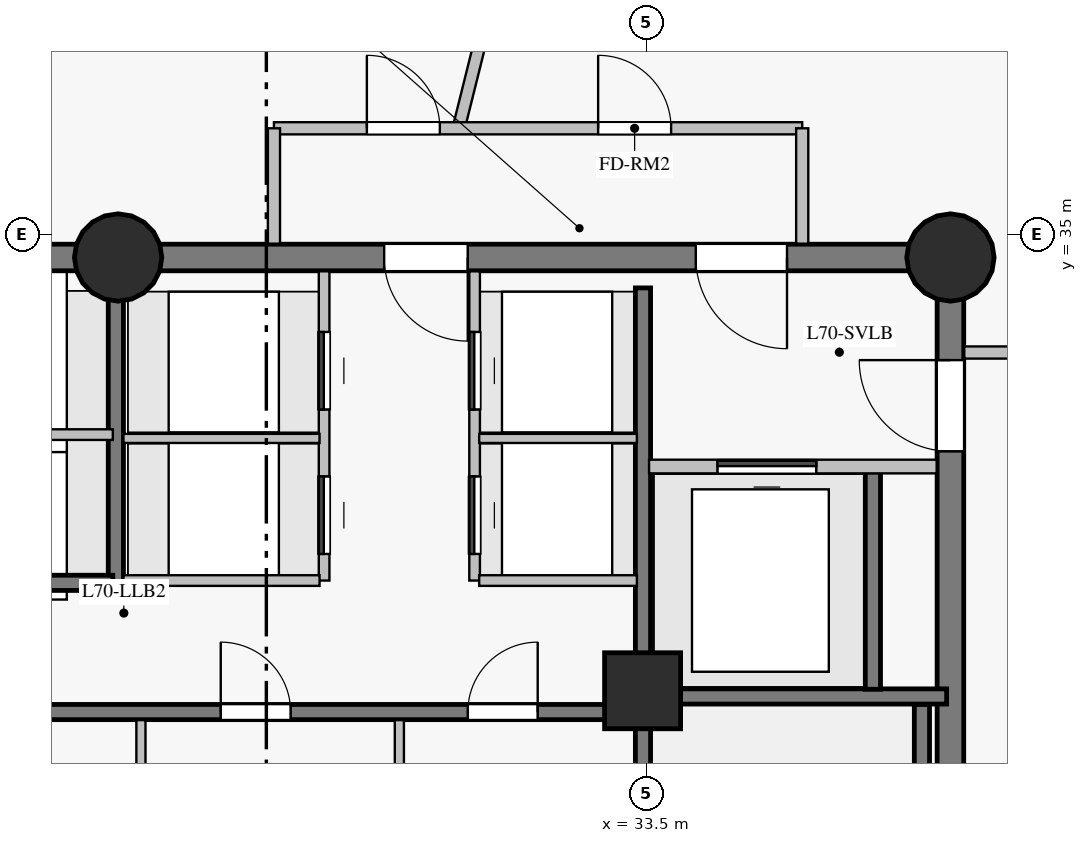
"""IFC4 building model, lengths in metres.
Left out: names, types, materials, properties, quantities, classifications, styles, units other than length and angle.
Written with IfcOpenShell. Run it as: python <this file> out.ifc"""

import sys

from ifc_helpers import new_model, si_unit, direction, frame, frame_2d, origin, origin_with_axes, origin_2d, place, context, subcontext, project, spatial, rectangle, circle, extrude, source, transform, mapped, element, fill, save


model = new_model("IFC4")
c1 = context("Model", 3, precision=1e-05, world=origin(), true_north=direction((0.0, 1.0)))
c2 = subcontext(c1, "Body", "Model", "MODEL_VIEW")
j1 = project(units=[si_unit("LENGTHUNIT", "METRE"), si_unit("PLANEANGLEUNIT", "RADIAN")], contexts=[c1])
p1 = place(None, origin())
s1 = spatial("IfcSite", under=j1, at=p1, CompositionType="ELEMENT")
p2 = place(p1, origin())
s2 = spatial("IfcBuilding", under=s1, at=p2, CompositionType="ELEMENT")
p3 = place(p2, frame((0.0, 0.0, 238.25)))
s3 = spatial("IfcBuildingStorey", under=s2, at=p3, CompositionType="ELEMENT", Elevation=238.25)
p4 = place(p3, frame((37.5, 18.3, 0.0), z_axis=(0.0, 0.0, 1.0), x_axis=(0.0, 1.0, 0.0)))
e1 = element("IfcWall", 1, at=p4, inside=s3, PredefinedType="SHEAR", context=c2, shape_type="SweptSolid", body=[
    extrude(rectangle(XDim=16.4, YDim=0.35, at=frame_2d((8.2, 0.0))), origin(), (0.0, 0.0, 1.0), 2.85),
])
p5 = place(p4, frame((13.85, 0.0, 0.0)))
e2 = element("IfcOpeningElement", 2, at=p5, cuts=e1, PredefinedType="OPENING", context=c2, shape_type="SweptSolid", body=[
    extrude(rectangle(XDim=1.2, YDim=2.15, at=frame_2d((0.6, 1.075))), frame((0.0, 0.185, 0.0), z_axis=(0.0, -1.0, 0.0), x_axis=(1.0, 0.0, 0.0)), (0.0, 0.0, 1.0), 0.37),
])
p6 = place(p3, frame((37.5, 34.7, 0.0), z_axis=(0.0, 0.0, 1.0), x_axis=(-1.0, 0.0, 0.0)))
e3 = element("IfcWall", 3, at=p6, inside=s3, PredefinedType="SHEAR", context=c2, shape_type="SweptSolid", body=[
    extrude(rectangle(XDim=10.95, YDim=0.35, at=frame_2d((5.475, 0.0))), origin(), (0.0, 0.0, 1.0), 2.85),
])
p7 = place(p6, frame((2.15, 0.0, 0.0)))
e4 = element("IfcOpeningElement", 4, at=p7, cuts=e3, PredefinedType="OPENING", context=c2, shape_type="SweptSolid", body=[
    extrude(rectangle(XDim=1.2, YDim=2.15, at=frame_2d((0.6, 1.075))), frame((0.0, 0.185, 0.0), z_axis=(0.0, -1.0, 0.0), x_axis=(1.0, 0.0, 0.0)), (0.0, 0.0, 1.0), 0.37),
])
p8 = place(p6, frame((6.35, 0.0, 0.0)))
e5 = element("IfcOpeningElement", 5, at=p8, cuts=e3, PredefinedType="OPENING", context=c2, shape_type="SweptSolid", body=[
    extrude(rectangle(XDim=1.1, YDim=2.15, at=frame_2d((0.55, 1.075))), frame((0.0, 0.185, 0.0), z_axis=(0.0, -1.0, 0.0), x_axis=(1.0, 0.0, 0.0)), (0.0, 0.0, 1.0), 0.37),
])
p9 = place(p3, frame((26.55, 34.7, 0.0), z_axis=(0.0, 0.0, 1.0), x_axis=(-1.0, 0.0, 0.0)))
e6 = element("IfcWall", 6, at=p9, inside=s3, PredefinedType="SHEAR", context=c2, shape_type="SweptSolid", body=[
    extrude(rectangle(XDim=7.05, YDim=0.35, at=frame_2d((3.525, 0.0))), origin(), (0.0, 0.0, 1.0), 2.85),
])
m1 = source(origin_with_axes(), c2, "Body", "SweptSolid", [
    extrude(circle(Radius=0.575, at=origin_2d()), origin(), (0.0, 0.0, 1.0), 3.05),
])
for number, where, z_axis, x_axis in (
    (7, (26.55, 34.7, 0.0), (0.0, 0.0, 1.0), (1.0, 0.0, 0.0)),
    (8, (37.5, 34.7, 0.0), (0.0, 0.0, 1.0), (1.0, 0.0, 0.0)),
):
    element("IfcColumn", number, at=place(p3, frame(where, z_axis=z_axis, x_axis=x_axis)), inside=s3, PredefinedType="COLUMN", context=c2, shape_type="MappedRepresentation", body=[
        mapped(m1, transform((0.0, 0.0, 0.0), scale=1.0)),
    ])
m2 = source(origin_with_axes(), c2, "Body", "SweptSolid", [
    extrude(rectangle(XDim=1.0, YDim=1.0, at=origin_2d()), origin(), (0.0, 0.0, 1.0), 3.05),
])
p10 = place(p3, frame((33.45, 29.0, 0.0), z_axis=(0.0, 0.0, 1.0), x_axis=(1.0, 0.0, 0.0)))
e9 = element("IfcColumn", 9, at=p10, inside=s3, PredefinedType="COLUMN", context=c2, shape_type="MappedRepresentation", body=[
    mapped(m2, transform((0.0, 0.0, 0.0), scale=1.0)),
])
p11 = place(p3, frame((43.586, 36.421, 0.0), z_axis=(0.0, 0.0, 1.0), x_axis=(-0.582142908701, 0.813086486082, 0.0)))
e10 = element("IfcWall", 10, at=p11, inside=s3, PredefinedType="SOLIDWALL", context=c2, shape_type="SweptSolid", body=[
    extrude(rectangle(XDim=11.712, YDim=0.28, at=frame_2d((5.856, 0.0))), origin(), (0.0, 0.0, 1.0), 2.85),
])
p12 = place(p11, frame((1.406, 0.0, 0.85)))
e11 = element("IfcOpeningElement", 11, at=p12, cuts=e10, PredefinedType="OPENING", context=c2, shape_type="SweptSolid", body=[
    extrude(rectangle(XDim=1.6, YDim=1.6, at=frame_2d((0.8, 0.8))), frame((0.0, 0.15, 0.0), z_axis=(0.0, -1.0, 0.0), x_axis=(1.0, 0.0, 0.0)), (0.0, 0.0, 1.0), 0.3),
])
p13 = place(p11, frame((5.056, 0.0, 0.85)))
e12 = element("IfcOpeningElement", 12, at=p13, cuts=e10, PredefinedType="OPENING", context=c2, shape_type="SweptSolid", body=[
    extrude(rectangle(XDim=1.6, YDim=1.6, at=frame_2d((0.8, 0.8))), frame((0.0, 0.15, 0.0), z_axis=(0.0, -1.0, 0.0), x_axis=(1.0, 0.0, 0.0)), (0.0, 0.0, 1.0), 0.3),
])
p14 = place(p11, frame((8.707, 0.0, 0.85)))
e13 = element("IfcOpeningElement", 13, at=p14, cuts=e10, PredefinedType="OPENING", context=c2, shape_type="SweptSolid", body=[
    extrude(rectangle(XDim=1.6, YDim=1.6, at=frame_2d((0.8, 0.8))), frame((0.0, 0.15, 0.0), z_axis=(0.0, -1.0, 0.0), x_axis=(1.0, 0.0, 0.0)), (0.0, 0.0, 1.0), 0.3),
])
p15 = place(p3, frame((33.455, 18.7, 0.0), z_axis=(0.0, 0.0, 1.0), x_axis=(0.0, 1.0, 0.0)))
e14 = element("IfcWall", 14, at=p15, inside=s3, PredefinedType="SHEAR", context=c2, shape_type="SweptSolid", body=[
    extrude(rectangle(XDim=15.6, YDim=0.2, at=frame_2d((7.8, 0.0))), origin(), (0.0, 0.0, 1.0), 2.85),
])
p16 = place(p15, frame((2.75, 0.0, 0.0)))
e15 = element("IfcOpeningElement", 15, at=p16, cuts=e14, PredefinedType="OPENING", context=c2, shape_type="SweptSolid", body=[
    extrude(rectangle(XDim=1.15, YDim=2.15, at=frame_2d((0.575, 1.075))), frame((0.0, 0.11, 0.0), z_axis=(0.0, -1.0, 0.0), x_axis=(1.0, 0.0, 0.0)), (0.0, 0.0, 1.0), 0.22),
])
p17 = place(p15, frame((0.55, 0.0, 0.0)))
e16 = element("IfcOpeningElement", 16, at=p17, cuts=e14, PredefinedType="OPENING", context=c2, shape_type="SweptSolid", body=[
    extrude(rectangle(XDim=0.94, YDim=2.1, at=frame_2d((0.47, 1.05))), frame((0.0, 0.11, 0.0), z_axis=(0.0, -1.0, 0.0), x_axis=(1.0, 0.0, 0.0)), (0.0, 0.0, 1.0), 0.22),
])
p18 = place(p3, frame((23.7, 28.72, 0.0), z_axis=(0.0, 0.0, 1.0), x_axis=(1.0, 0.0, 0.0)))
e17 = element("IfcWall", 17, at=p18, inside=s3, PredefinedType="SHEAR", context=c2, shape_type="SweptSolid", body=[
    extrude(rectangle(XDim=9.6, YDim=0.2, at=frame_2d((4.8, 0.0))), origin(), (0.0, 0.0, 1.0), 2.85),
])
p19 = place(p18, frame((0.7, 0.0, 0.0)))
e18 = element("IfcOpeningElement", 18, at=p19, cuts=e17, PredefinedType="OPENING", context=c2, shape_type="SweptSolid", body=[
    extrude(rectangle(XDim=0.92, YDim=2.1, at=frame_2d((0.46, 1.05))), frame((0.0, 0.11, 0.0), z_axis=(0.0, -1.0, 0.0), x_axis=(1.0, 0.0, 0.0)), (0.0, 0.0, 1.0), 0.22),
])
p20 = place(p18, frame((4.2, 0.0, 0.0)))
e19 = element("IfcOpeningElement", 19, at=p20, cuts=e17, PredefinedType="OPENING", context=c2, shape_type="SweptSolid", body=[
    extrude(rectangle(XDim=0.92, YDim=2.1, at=frame_2d((0.46, 1.05))), frame((0.0, 0.11, 0.0), z_axis=(0.0, -1.0, 0.0), x_axis=(1.0, 0.0, 0.0)), (0.0, 0.0, 1.0), 0.22),
])
p21 = place(p18, frame((7.45, 0.0, 0.0)))
e20 = element("IfcOpeningElement", 20, at=p21, cuts=e17, PredefinedType="OPENING", context=c2, shape_type="SweptSolid", body=[
    extrude(rectangle(XDim=0.92, YDim=2.1, at=frame_2d((0.46, 1.05))), frame((0.0, 0.11, 0.0), z_axis=(0.0, -1.0, 0.0), x_axis=(1.0, 0.0, 0.0)), (0.0, 0.0, 1.0), 0.22),
])
p22 = place(p3, frame((37.125, 21.32, 0.0), z_axis=(0.0, 0.0, 1.0), x_axis=(0.0, 1.0, 0.0)))
e21 = element("IfcWall", 21, at=p22, inside=s3, PredefinedType="SHEAR", context=c2, shape_type="SweptSolid", body=[
    extrude(rectangle(XDim=7.5, YDim=0.2, at=frame_2d((3.75, 0.0))), origin(), (0.0, 0.0, 1.0), 2.85),
])
p23 = place(p3, frame((33.455, 28.925, 0.0), z_axis=(0.0, 0.0, 1.0), x_axis=(1.0, 0.0, 0.0)))
e22 = element("IfcWall", 22, at=p23, inside=s3, PredefinedType="SHEAR", context=c2, shape_type="SweptSolid", body=[
    extrude(rectangle(XDim=3.995, YDim=0.2, at=frame_2d((1.998, 0.0))), origin(), (0.0, 0.0, 1.0), 2.85),
])
p24 = place(p3, frame((26.52, 30.42, 0.0), z_axis=(0.0, 0.0, 1.0), x_axis=(0.0, 1.0, 0.0)))
e23 = element("IfcWall", 23, at=p24, inside=s3, PredefinedType="SHEAR", context=c2, shape_type="SweptSolid", body=[
    extrude(rectangle(XDim=3.86, YDim=0.2, at=frame_2d((1.93, 0.0))), origin(), (0.0, 0.0, 1.0), 2.85),
])
p25 = place(p3, frame((36.48, 29.02, 0.0), z_axis=(0.0, 0.0, 1.0), x_axis=(0.0, 1.0, 0.0)))
e24 = element("IfcWall", 24, at=p25, inside=s3, PredefinedType="SHEAR", context=c2, shape_type="SweptSolid", body=[
    extrude(rectangle(XDim=2.86, YDim=0.2, at=frame_2d((1.43, 0.0))), origin(), (0.0, 0.0, 1.0), 2.85),
])
p26 = place(p3, frame((23.7, 30.42, 0.0), z_axis=(0.0, 0.0, 1.0), x_axis=(1.0, 0.0, 0.0)))
e25 = element("IfcWall", 25, at=p26, inside=s3, PredefinedType="SHEAR", context=c2, shape_type="SweptSolid", body=[
    extrude(rectangle(XDim=2.78, YDim=0.2, at=frame_2d((1.39, 0.0))), origin(), (0.0, 0.0, 1.0), 2.85),
])
p27 = place(p3, frame((31.023, 36.371, 0.0), z_axis=(0.0, 0.0, 1.0), x_axis=(0.241913852828, 0.970297731529, 0.0)))
e26 = element("IfcWall", 26, at=p27, inside=s3, PredefinedType="PARTITIONING", context=c2, shape_type="SweptSolid", body=[
    extrude(rectangle(XDim=10.348, YDim=0.16, at=frame_2d((5.174, 0.0))), origin(), (0.0, 0.0, 1.0), 2.85),
])
p28 = place(p3, frame((28.6, 36.4, 0.0), z_axis=(0.0, 0.0, 1.0), x_axis=(1.0, 0.0, 0.0)))
e27 = element("IfcWall", 27, at=p28, inside=s3, PredefinedType="PARTITIONING", context=c2, shape_type="SweptSolid", body=[
    extrude(rectangle(XDim=6.95, YDim=0.16, at=frame_2d((3.475, 0.0))), origin(), (0.0, 0.0, 1.0), 2.45),
])
p29 = place(p28, frame((4.265, 0.0, 0.0)))
e28 = element("IfcOpeningElement", 28, at=p29, cuts=e27, PredefinedType="OPENING", context=c2, shape_type="SweptSolid", body=[
    extrude(rectangle(XDim=0.96, YDim=2.15, at=frame_2d((0.48, 1.075))), frame((0.0, 0.09, 0.0), z_axis=(0.0, -1.0, 0.0), x_axis=(1.0, 0.0, 0.0)), (0.0, 0.0, 1.0), 0.18),
])
p30 = place(p28, frame((1.222, 0.0, 0.0)))
e29 = element("IfcOpeningElement", 29, at=p30, cuts=e27, PredefinedType="OPENING", context=c2, shape_type="SweptSolid", body=[
    extrude(rectangle(XDim=0.96, YDim=2.15, at=frame_2d((0.48, 1.075))), frame((0.0, 0.09, 0.0), z_axis=(0.0, -1.0, 0.0), x_axis=(1.0, 0.0, 0.0)), (0.0, 0.0, 1.0), 0.18),
])
p31 = place(p3, frame((37.682, 33.45, 0.0), z_axis=(0.0, 0.0, 1.0), x_axis=(1.0, 0.0, 0.0)))
e30 = element("IfcWall", 30, at=p31, inside=s3, PredefinedType="PARTITIONING", context=c2, shape_type="SweptSolid", body=[
    extrude(rectangle(XDim=4.118, YDim=0.16, at=frame_2d((2.059, 0.0))), origin(), (0.0, 0.0, 1.0), 2.85),
])
p32 = place(p3, frame((29.26, 30.45, 0.0), z_axis=(0.0, 0.0, 1.0), x_axis=(0.0, 1.0, 0.0)))
e31 = element("IfcWall", 31, at=p32, inside=s3, PredefinedType="PARTITIONING", context=c2, shape_type="SweptSolid", body=[
    extrude(rectangle(XDim=4.068, YDim=0.14, at=frame_2d((2.034, 0.0))), origin(), (0.0, 0.0, 1.0), 2.85),
])
p33 = place(p32, frame((0.35, 0.0, 0.0)))
e32 = element("IfcOpeningElement", 32, at=p33, cuts=e31, PredefinedType="OPENING", context=c2, shape_type="SweptSolid", body=[
    extrude(rectangle(XDim=1.02, YDim=2.15, at=frame_2d((0.51, 1.075))), frame((0.0, 0.08, 0.0), z_axis=(0.0, -1.0, 0.0), x_axis=(1.0, 0.0, 0.0)), (0.0, 0.0, 1.0), 0.16),
])
p34 = place(p32, frame((2.25, 0.0, 0.0)))
e33 = element("IfcOpeningElement", 33, at=p34, cuts=e31, PredefinedType="OPENING", context=c2, shape_type="SweptSolid", body=[
    extrude(rectangle(XDim=1.02, YDim=2.15, at=frame_2d((0.51, 1.075))), frame((0.0, 0.08, 0.0), z_axis=(0.0, -1.0, 0.0), x_axis=(1.0, 0.0, 0.0)), (0.0, 0.0, 1.0), 0.16),
])
p35 = place(p3, frame((31.24, 30.45, 0.0), z_axis=(0.0, 0.0, 1.0), x_axis=(0.0, 1.0, 0.0)))
e34 = element("IfcWall", 34, at=p35, inside=s3, PredefinedType="PARTITIONING", context=c2, shape_type="SweptSolid", body=[
    extrude(rectangle(XDim=4.068, YDim=0.14, at=frame_2d((2.034, 0.0))), origin(), (0.0, 0.0, 1.0), 2.85),
])
p36 = place(p35, frame((0.35, 0.0, 0.0)))
e35 = element("IfcOpeningElement", 35, at=p36, cuts=e34, PredefinedType="OPENING", context=c2, shape_type="SweptSolid", body=[
    extrude(rectangle(XDim=1.02, YDim=2.15, at=frame_2d((0.51, 1.075))), frame((0.0, 0.08, 0.0), z_axis=(0.0, -1.0, 0.0), x_axis=(1.0, 0.0, 0.0)), (0.0, 0.0, 1.0), 0.16),
])
p37 = place(p35, frame((2.25, 0.0, 0.0)))
e36 = element("IfcOpeningElement", 36, at=p37, cuts=e34, PredefinedType="OPENING", context=c2, shape_type="SweptSolid", body=[
    extrude(rectangle(XDim=1.02, YDim=2.15, at=frame_2d((0.51, 1.075))), frame((0.0, 0.08, 0.0), z_axis=(0.0, -1.0, 0.0), x_axis=(1.0, 0.0, 0.0)), (0.0, 0.0, 1.0), 0.16),
])
p38 = place(p3, frame((33.535, 31.95, 0.0), z_axis=(0.0, 0.0, 1.0), x_axis=(1.0, 0.0, 0.0)))
e37 = element("IfcWall", 37, at=p38, inside=s3, PredefinedType="PARTITIONING", context=c2, shape_type="SweptSolid", body=[
    extrude(rectangle(XDim=3.784, YDim=0.18, at=frame_2d((1.892, 0.0))), origin(), (0.0, 0.0, 1.0), 2.85),
])
p39 = place(p38, frame((0.9, 0.0, 0.0)))
e38 = element("IfcOpeningElement", 38, at=p39, cuts=e37, PredefinedType="OPENING", context=c2, shape_type="SweptSolid", body=[
    extrude(rectangle(XDim=1.3, YDim=2.2, at=frame_2d((0.65, 1.1))), frame((0.0, 0.1, 0.0), z_axis=(0.0, -1.0, 0.0), x_axis=(1.0, 0.0, 0.0)), (0.0, 0.0, 1.0), 0.2),
])
p40 = place(p3, frame((23.652, 32.37, 0.0), z_axis=(0.0, 0.0, 1.0), x_axis=(1.0, 0.0, 0.0)))
e39 = element("IfcWall", 39, at=p40, inside=s3, PredefinedType="PARTITIONING", context=c2, shape_type="SweptSolid", body=[
    extrude(rectangle(XDim=2.828, YDim=0.14, at=frame_2d((1.414, 0.0))), origin(), (0.0, 0.0, 1.0), 2.85),
])
p41 = place(p3, frame((26.62, 30.45, 0.0), z_axis=(0.0, 0.0, 1.0), x_axis=(1.0, 0.0, 0.0)))
e40 = element("IfcWall", 40, at=p41, inside=s3, PredefinedType="PARTITIONING", context=c2, shape_type="SweptSolid", body=[
    extrude(rectangle(XDim=2.58, YDim=0.14, at=frame_2d((1.29, 0.0))), origin(), (0.0, 0.0, 1.0), 2.85),
])
p42 = place(p3, frame((26.62, 32.32, 0.0), z_axis=(0.0, 0.0, 1.0), x_axis=(1.0, 0.0, 0.0)))
e41 = element("IfcWall", 41, at=p42, inside=s3, PredefinedType="PARTITIONING", context=c2, shape_type="SweptSolid", body=[
    extrude(rectangle(XDim=2.58, YDim=0.12, at=frame_2d((1.29, 0.0))), origin(), (0.0, 0.0, 1.0), 2.85),
])
for number, where, z_axis, x_axis in (
    (42, (26.85, 26.027, 0.0), (0.0, 0.0, 1.0), (0.0, 1.0, 0.0)),
    (43, (30.25, 26.027, 0.0), (0.0, 0.0, 1.0), (0.0, 1.0, 0.0)),
):
    element("IfcWall", number, at=place(p3, frame(where, z_axis=z_axis, x_axis=x_axis)), inside=s3, PredefinedType="PARTITIONING", context=c2, shape_type="SweptSolid", body=[
        extrude(rectangle(XDim=2.587, YDim=0.12, at=frame_2d((1.293, 0.0))), origin(), (0.0, 0.0, 1.0), 2.85),
    ])
p43 = place(p3, frame((31.3, 30.45, 0.0), z_axis=(0.0, 0.0, 1.0), x_axis=(1.0, 0.0, 0.0)))
e44 = element("IfcWall", 44, at=p43, inside=s3, PredefinedType="PARTITIONING", context=c2, shape_type="SweptSolid", body=[
    extrude(rectangle(XDim=2.075, YDim=0.14, at=frame_2d((1.038, 0.0))), origin(), (0.0, 0.0, 1.0), 2.85),
])
p44 = place(p3, frame((31.3, 32.32, 0.0), z_axis=(0.0, 0.0, 1.0), x_axis=(1.0, 0.0, 0.0)))
e45 = element("IfcWall", 45, at=p44, inside=s3, PredefinedType="PARTITIONING", context=c2, shape_type="SweptSolid", body=[
    extrude(rectangle(XDim=2.075, YDim=0.12, at=frame_2d((1.038, 0.0))), origin(), (0.0, 0.0, 1.0), 2.85),
])
for number, where, z_axis, x_axis in (
    (46, (28.6, 34.882, 0.0), (0.0, 0.0, 1.0), (0.0, 1.0, 0.0)),
    (47, (35.55, 36.4, 0.0), (0.0, 0.0, 1.0), (0.0, -1.0, 0.0)),
):
    element("IfcWall", number, at=place(p3, frame(where, z_axis=z_axis, x_axis=x_axis)), inside=s3, PredefinedType="PARTITIONING", context=c2, shape_type="SweptSolid", body=[
        extrude(rectangle(XDim=1.518, YDim=0.16, at=frame_2d((0.759, 0.0))), origin(), (0.0, 0.0, 1.0), 2.85),
    ])
m3 = source(origin_with_axes(), c2, "Body", "SweptSolid", [
    extrude(rectangle(XDim=1.2, YDim=2.15, at=frame_2d((0.6, 1.075))), frame((0.0, 0.025, 0.0), z_axis=(0.0, -1.0, 0.0), x_axis=(1.0, 0.0, 0.0)), (0.0, 0.0, 1.0), 0.05),
])
p45 = place(p5, origin())
e48 = element("IfcDoor", 48, at=p45, inside=s3, OperationType="SINGLE_SWING_RIGHT", PredefinedType="DOOR", context=c2, shape_type="MappedRepresentation", body=[
    mapped(m3, transform((0.0, 0.0, 0.0), scale=1.0)),
])
fill(e2, e48)
p46 = place(p7, origin())
e49 = element("IfcDoor", 49, at=p46, inside=s3, OperationType="SINGLE_SWING_LEFT", PredefinedType="DOOR", context=c2, shape_type="MappedRepresentation", body=[
    mapped(m3, transform((0.0, 0.0, 0.0), scale=1.0)),
])
fill(e4, e49)
m4 = source(origin_with_axes(), c2, "Body", "SweptSolid", [
    extrude(rectangle(XDim=1.3, YDim=2.2, at=frame_2d((0.65, 1.1))), frame((0.0, 0.025, 0.0), z_axis=(0.0, -1.0, 0.0), x_axis=(1.0, 0.0, 0.0)), (0.0, 0.0, 1.0), 0.05),
])
p47 = place(p39, origin())
e50 = element("IfcDoor", 50, at=p47, inside=s3, OperationType="SLIDING_TO_LEFT", PredefinedType="DOOR", context=c2, shape_type="MappedRepresentation", body=[
    mapped(m4, transform((0.0, 0.0, 0.0), scale=1.0)),
])
fill(e38, e50)
m5 = source(origin_with_axes(), c2, "Body", "SweptSolid", [
    extrude(rectangle(XDim=0.92, YDim=2.1, at=frame_2d((0.46, 1.05))), frame((0.0, 0.025, 0.0), z_axis=(0.0, -1.0, 0.0), x_axis=(1.0, 0.0, 0.0)), (0.0, 0.0, 1.0), 0.05),
])
p48 = place(p20, origin())
e51 = element("IfcDoor", 51, at=p48, inside=s3, OperationType="SINGLE_SWING_LEFT", PredefinedType="DOOR", context=c2, shape_type="MappedRepresentation", body=[
    mapped(m5, transform((0.0, 0.0, 0.0), scale=1.0)),
])
fill(e19, e51)
p49 = place(p21, origin())
e52 = element("IfcDoor", 52, at=p49, inside=s3, OperationType="SINGLE_SWING_RIGHT", PredefinedType="DOOR", context=c2, shape_type="MappedRepresentation", body=[
    mapped(m5, transform((0.0, 0.0, 0.0), scale=1.0)),
])
fill(e20, e52)
m6 = source(origin_with_axes(), c2, "Body", "SweptSolid", [
    extrude(rectangle(XDim=1.1, YDim=2.15, at=frame_2d((0.55, 1.075))), frame((0.0, 0.025, 0.0), z_axis=(0.0, -1.0, 0.0), x_axis=(1.0, 0.0, 0.0)), (0.0, 0.0, 1.0), 0.05),
])
p50 = place(p8, origin())
e53 = element("IfcDoor", 53, at=p50, inside=s3, OperationType="SINGLE_SWING_LEFT", PredefinedType="DOOR", context=c2, shape_type="MappedRepresentation", body=[
    mapped(m6, transform((0.0, 0.0, 0.0), scale=1.0)),
])
fill(e5, e53)
m7 = source(origin_with_axes(), c2, "Body", "SweptSolid", [
    extrude(rectangle(XDim=1.02, YDim=2.15, at=frame_2d((0.51, 1.075))), frame((0.0, 0.025, 0.0), z_axis=(0.0, -1.0, 0.0), x_axis=(1.0, 0.0, 0.0)), (0.0, 0.0, 1.0), 0.05),
])
p51 = place(p33, origin())
e54 = element("IfcDoor", 54, at=p51, inside=s3, OperationType="SLIDING_TO_LEFT", PredefinedType="DOOR", context=c2, shape_type="MappedRepresentation", body=[
    mapped(m7, transform((0.0, 0.0, 0.0), scale=1.0)),
])
fill(e32, e54)
p52 = place(p34, origin())
e55 = element("IfcDoor", 55, at=p52, inside=s3, OperationType="SLIDING_TO_LEFT", PredefinedType="DOOR", context=c2, shape_type="MappedRepresentation", body=[
    mapped(m7, transform((0.0, 0.0, 0.0), scale=1.0)),
])
fill(e33, e55)
p53 = place(p36, origin())
e56 = element("IfcDoor", 56, at=p53, inside=s3, OperationType="SLIDING_TO_LEFT", PredefinedType="DOOR", context=c2, shape_type="MappedRepresentation", body=[
    mapped(m7, transform((0.0, 0.0, 0.0), scale=1.0)),
])
fill(e35, e56)
p54 = place(p37, origin())
e57 = element("IfcDoor", 57, at=p54, inside=s3, OperationType="SLIDING_TO_LEFT", PredefinedType="DOOR", context=c2, shape_type="MappedRepresentation", body=[
    mapped(m7, transform((0.0, 0.0, 0.0), scale=1.0)),
])
fill(e36, e57)
m8 = source(origin_with_axes(), c2, "Body", "SweptSolid", [
    extrude(rectangle(XDim=0.96, YDim=2.15, at=frame_2d((0.48, 1.075))), frame((0.0, 0.025, 0.0), z_axis=(0.0, -1.0, 0.0), x_axis=(1.0, 0.0, 0.0)), (0.0, 0.0, 1.0), 0.05),
])
p55 = place(p29, origin())
e58 = element("IfcDoor", 58, at=p55, inside=s3, OperationType="SINGLE_SWING_LEFT", PredefinedType="DOOR", context=c2, shape_type="MappedRepresentation", body=[
    mapped(m8, transform((0.0, 0.0, 0.0), scale=1.0)),
])
fill(e28, e58)
p56 = place(p30, origin())
e59 = element("IfcDoor", 59, at=p56, inside=s3, OperationType="SINGLE_SWING_LEFT", PredefinedType="DOOR", context=c2, shape_type="MappedRepresentation", body=[
    mapped(m8, transform((0.0, 0.0, 0.0), scale=1.0)),
])
fill(e29, e59)
save(model, sys.argv[1])
